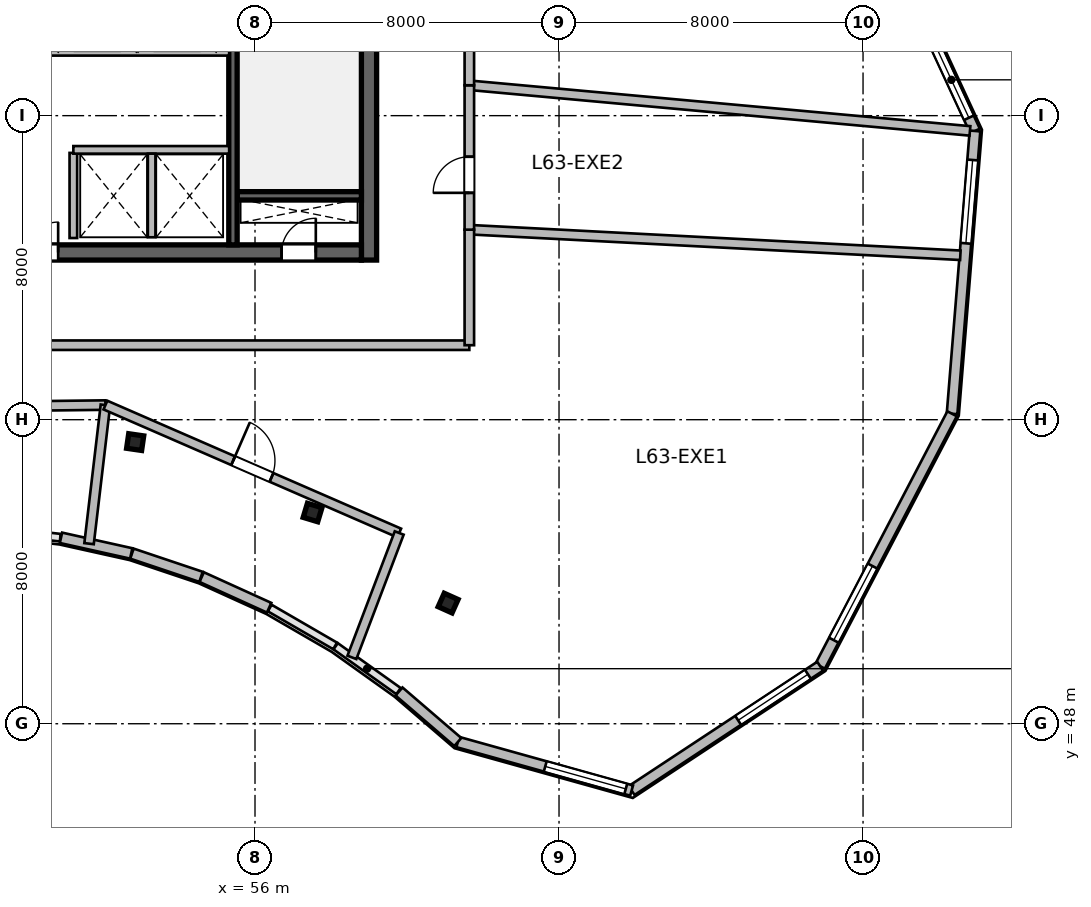
"""IFC4 building model, lengths in metres.
Left out: names, types, materials, properties, quantities, classifications, styles, units other than length and angle.
Written with IfcOpenShell. Run it as: python <this file> out.ifc"""

import sys

from ifc_helpers import new_model, si_unit, direction, frame, frame_2d, origin, origin_2d, place, context, subcontext, project, spatial, rectangle, i_section, extrude, source, transform, mapped, element, fill, save


model = new_model("IFC4")
c1 = context("Model", 3, precision=1e-05, world=origin(), true_north=direction((0.0, 1.0)))
c2 = subcontext(c1, "Body", "Model", "MODEL_VIEW")
j1 = project(units=[si_unit("LENGTHUNIT", "METRE"), si_unit("PLANEANGLEUNIT", "RADIAN")], contexts=[c1])
p1 = place(None, origin())
s1 = spatial("IfcSite", under=j1, at=p1, CompositionType="ELEMENT")
p2 = place(p1, origin())
s2 = spatial("IfcBuilding", under=s1, at=p2, CompositionType="ELEMENT")
p3 = place(p2, frame((0.0, 0.0, 260.1)))
s3 = spatial("IfcBuildingStorey", under=s2, at=p3, CompositionType="ELEMENT", Elevation=260.1)
m1 = source(origin(), c2, "Body", "SweptSolid", [
    extrude(rectangle(XDim=12.0, YDim=0.4, at=frame_2d((6.0, 0.0))), origin(), (0.0, 0.0, 1.0), 3.9),
])
p4 = place(p3, frame((59.0, 60.2, 0.0), z_axis=(0.0, 0.0, 1.0), x_axis=(0.0, 1.0, 0.0)))
e1 = element("IfcWall", 1, at=p4, inside=s3, PredefinedType="SHEAR", context=c2, shape_type="MappedRepresentation", body=[
    mapped(m1, transform((0.0, 0.0, 0.0), scale=1.0)),
])
m2 = source(origin(), c2, "Body", "SweptSolid", [
    extrude(rectangle(XDim=21.6, YDim=0.4, at=frame_2d((10.8, 0.0))), origin(), (0.0, 0.0, 1.0), 3.9),
])
p5 = place(p3, frame((37.2, 60.4, 0.0), z_axis=(0.0, 0.0, 1.0), x_axis=(1.0, 0.0, 0.0)))
e2 = element("IfcWall", 2, at=p5, inside=s3, PredefinedType="SHEAR", context=c2, shape_type="MappedRepresentation", body=[
    mapped(m2, transform((0.0, 0.0, 0.0), scale=1.0)),
])
p6 = place(p5, frame((1.1, 0.0, 0.0)))
e3 = element("IfcOpeningElement", 3, at=p6, cuts=e2, PredefinedType="OPENING", context=c2, shape_type="SweptSolid", body=[
    extrude(rectangle(XDim=1.15, YDim=2.15, at=frame_2d((0.575, 1.075))), frame((0.0, 0.21, 0.0), z_axis=(0.0, -1.0, 0.0), x_axis=(1.0, 0.0, 0.0)), (0.0, 0.0, 1.0), 0.42),
])
p7 = place(p5, frame((19.5, 0.0, 0.0)))
e4 = element("IfcOpeningElement", 4, at=p7, cuts=e2, PredefinedType="OPENING", context=c2, shape_type="SweptSolid", body=[
    extrude(rectangle(XDim=0.9, YDim=2.1, at=frame_2d((0.45, 1.05))), frame((0.0, 0.21, 0.0), z_axis=(0.0, -1.0, 0.0), x_axis=(1.0, 0.0, 0.0)), (0.0, 0.0, 1.0), 0.42),
])
p8 = place(p5, frame((12.02, 0.0, 0.0)))
e5 = element("IfcOpeningElement", 5, at=p8, cuts=e2, PredefinedType="OPENING", context=c2, shape_type="SweptSolid", body=[
    extrude(rectangle(XDim=1.6, YDim=2.15, at=frame_2d((0.8, 1.075))), frame((0.0, 0.21, 0.0), z_axis=(0.0, -1.0, 0.0), x_axis=(1.0, 0.0, 0.0)), (0.0, 0.0, 1.0), 0.42),
])
m3 = source(origin(), c2, "Body", "SweptSolid", [
    extrude(rectangle(XDim=3.27, YDim=0.22, at=frame_2d((1.635, 0.0))), origin(), (0.0, 0.0, 1.0), 3.9),
])
p9 = place(p3, frame((55.53, 61.89, 0.0), z_axis=(0.0, 0.0, 1.0), x_axis=(1.0, 0.0, 0.0)))
e6 = element("IfcWall", 6, at=p9, inside=s3, PredefinedType="SHEAR", context=c2, shape_type="MappedRepresentation", body=[
    mapped(m3, transform((0.0, 0.0, 0.0), scale=1.0)),
])
m4 = source(origin(), c2, "Body", "SweptSolid", [
    extrude(rectangle(XDim=11.2, YDim=0.22, at=frame_2d((5.6, 0.0))), origin(), (0.0, 0.0, 1.0), 3.9),
])
p10 = place(p3, frame((55.42, 60.6, 0.0), z_axis=(0.0, 0.0, 1.0), x_axis=(0.0, 1.0, 0.0)))
e7 = element("IfcWall", 7, at=p10, inside=s3, PredefinedType="SHEAR", context=c2, shape_type="MappedRepresentation", body=[
    mapped(m4, transform((0.0, 0.0, 0.0), scale=1.0)),
])
p11 = place(p10, frame((9.645, 0.0, 0.0)))
e8 = element("IfcOpeningElement", 8, at=p11, cuts=e7, PredefinedType="OPENING", context=c2, shape_type="SweptSolid", body=[
    extrude(rectangle(XDim=1.15, YDim=2.15, at=frame_2d((0.575, 1.075))), frame((0.0, 0.12, 0.0), z_axis=(0.0, -1.0, 0.0), x_axis=(1.0, 0.0, 0.0)), (0.0, 0.0, 1.0), 0.24),
])
m5 = source(origin(), c2, "Body", "SweptSolid", [
    extrude(i_section(OverallWidth=0.399, OverallDepth=0.387, WebThickness=0.021, FlangeThickness=0.033, at=origin_2d()), origin(), (0.0, 0.0, 1.0), 3.9),
])
for number, where, z_axis, x_axis in (
    (9, (52.846, 55.411, 0.0), (0.0, 0.0, 1.0), (0.143, 0.99, 0.0)),
    (10, (57.515, 53.558, 0.0), (0.0, 0.0, 1.0), (0.289, 0.957, 0.0)),
    (11, (61.082, 51.175, 0.0), (0.0, 0.0, 1.0), (0.409, 0.912, 0.0)),
):
    element("IfcColumn", number, at=place(p3, frame(where, z_axis=z_axis, x_axis=x_axis)), inside=s3, PredefinedType="COLUMN", context=c2, shape_type="MappedRepresentation", body=[
        mapped(m5, transform((0.0, 0.0, 0.0), scale=1.0)),
    ])
m6 = source(origin(), c2, "Body", "SweptSolid", [
    extrude(rectangle(XDim=5.928, YDim=0.28, at=frame_2d((2.964, 0.0))), origin(), (0.0, 0.0, 1.0), 3.65),
])
p12 = place(p3, frame((72.459, 68.979, 0.0), z_axis=(0.0, 0.0, 1.0), x_axis=(0.41942378221, -0.907790554543, 0.0)))
e12 = element("IfcWall", 12, at=p12, inside=s3, PredefinedType="SOLIDWALL", context=c2, shape_type="MappedRepresentation", body=[
    mapped(m6, transform((0.0, 0.0, 0.0), scale=1.0)),
])
p13 = place(p12, frame((3.346, 0.0, 0.95)))
e13 = element("IfcOpeningElement", 13, at=p13, cuts=e12, PredefinedType="OPENING", context=c2, shape_type="SweptSolid", body=[
    extrude(rectangle(XDim=2.2, YDim=2.1, at=frame_2d((1.1, 1.05))), frame((0.0, 0.15, 0.0), z_axis=(0.0, -1.0, 0.0), x_axis=(1.0, 0.0, 0.0)), (0.0, 0.0, 1.0), 0.3),
])
m7 = source(origin(), c2, "Body", "SweptSolid", [
    extrude(rectangle(XDim=7.466, YDim=0.28, at=frame_2d((3.733, 0.0))), origin(), (0.0, 0.0, 1.0), 3.65),
])
p14 = place(p3, frame((74.946, 63.597, 0.0), z_axis=(0.0, 0.0, 1.0), x_axis=(-0.080804454221, -0.996729973553, 0.0)))
e14 = element("IfcWall", 14, at=p14, inside=s3, PredefinedType="SOLIDWALL", context=c2, shape_type="MappedRepresentation", body=[
    mapped(m7, transform((0.0, 0.0, 0.0), scale=1.0)),
])
p15 = place(p14, frame((0.767, 0.0, 0.95)))
e15 = element("IfcOpeningElement", 15, at=p15, cuts=e14, PredefinedType="OPENING", context=c2, shape_type="SweptSolid", body=[
    extrude(rectangle(XDim=2.2, YDim=2.1, at=frame_2d((1.1, 1.05))), frame((0.0, 0.15, 0.0), z_axis=(0.0, -1.0, 0.0), x_axis=(1.0, 0.0, 0.0)), (0.0, 0.0, 1.0), 0.3),
])
m8 = source(origin(), c2, "Body", "SweptSolid", [
    extrude(rectangle(XDim=7.495, YDim=0.28, at=frame_2d((3.748, 0.0))), origin(), (0.0, 0.0, 1.0), 3.65),
])
p16 = place(p3, frame((74.343, 56.156, 0.0), z_axis=(0.0, 0.0, 1.0), x_axis=(-0.463116979657, -0.886297164135, 0.0)))
e16 = element("IfcWall", 16, at=p16, inside=s3, PredefinedType="SOLIDWALL", context=c2, shape_type="MappedRepresentation", body=[
    mapped(m8, transform((0.0, 0.0, 0.0), scale=1.0)),
])
p17 = place(p16, frame((4.521, 0.0, 0.95)))
e17 = element("IfcOpeningElement", 17, at=p17, cuts=e16, PredefinedType="OPENING", context=c2, shape_type="SweptSolid", body=[
    extrude(rectangle(XDim=2.2, YDim=2.1, at=frame_2d((1.1, 1.05))), frame((0.0, 0.15, 0.0), z_axis=(0.0, -1.0, 0.0), x_axis=(1.0, 0.0, 0.0)), (0.0, 0.0, 1.0), 0.3),
])
m9 = source(origin(), c2, "Body", "SweptSolid", [
    extrude(rectangle(XDim=5.942, YDim=0.28, at=frame_2d((2.971, 0.0))), origin(), (0.0, 0.0, 1.0), 3.65),
])
p18 = place(p3, frame((70.872, 49.513, 0.0), z_axis=(0.0, 0.0, 1.0), x_axis=(-0.834871099304, -0.550445499162, 0.0)))
e18 = element("IfcWall", 18, at=p18, inside=s3, PredefinedType="SOLIDWALL", context=c2, shape_type="MappedRepresentation", body=[
    mapped(m9, transform((0.0, 0.0, 0.0), scale=1.0)),
])
p19 = place(p18, frame((0.385, 0.0, 0.95)))
e19 = element("IfcOpeningElement", 19, at=p19, cuts=e18, PredefinedType="OPENING", context=c2, shape_type="SweptSolid", body=[
    extrude(rectangle(XDim=2.2, YDim=2.1, at=frame_2d((1.1, 1.05))), frame((0.0, 0.15, 0.0), z_axis=(0.0, -1.0, 0.0), x_axis=(1.0, 0.0, 0.0)), (0.0, 0.0, 1.0), 0.3),
])
m10 = source(origin(), c2, "Body", "SweptSolid", [
    extrude(rectangle(XDim=4.749, YDim=0.28, at=frame_2d((2.374, 0.0))), origin(), (0.0, 0.0, 1.0), 3.65),
])
p20 = place(p3, frame((65.91, 46.242, 0.0), z_axis=(0.0, 0.0, 1.0), x_axis=(-0.963210849911, 0.268746829961, 0.0)))
e20 = element("IfcWall", 20, at=p20, inside=s3, PredefinedType="SOLIDWALL", context=c2, shape_type="MappedRepresentation", body=[
    mapped(m10, transform((0.0, 0.0, 0.0), scale=1.0)),
])
p21 = place(p20, frame((0.16, 0.0, 0.95)))
e21 = element("IfcOpeningElement", 21, at=p21, cuts=e20, PredefinedType="OPENING", context=c2, shape_type="SweptSolid", body=[
    extrude(rectangle(XDim=2.2, YDim=2.1, at=frame_2d((1.1, 1.05))), frame((0.0, 0.15, 0.0), z_axis=(0.0, -1.0, 0.0), x_axis=(1.0, 0.0, 0.0)), (0.0, 0.0, 1.0), 0.3),
])
m11 = source(origin(), c2, "Body", "SweptSolid", [
    extrude(rectangle(XDim=2.04, YDim=0.28, at=frame_2d((1.02, 0.0))), origin(), (0.0, 0.0, 1.0), 3.65),
])
p22 = place(p3, frame((61.337, 47.519, 0.0), z_axis=(0.0, 0.0, 1.0), x_axis=(-0.758402847119, 0.651786101019, 0.0)))
e22 = element("IfcWall", 22, at=p22, inside=s3, PredefinedType="SOLIDWALL", context=c2, shape_type="MappedRepresentation", body=[
    mapped(m11, transform((0.0, 0.0, 0.0), scale=1.0)),
])
m12 = source(origin(), c2, "Body", "SweptSolid", [
    extrude(rectangle(XDim=1.95, YDim=0.28, at=frame_2d((0.975, 0.0))), origin(), (0.0, 0.0, 1.0), 3.65),
])
p23 = place(p3, frame((56.372, 51.052, 0.0), z_axis=(0.0, 0.0, 1.0), x_axis=(-0.910507945155, 0.413491574048, 0.0)))
e23 = element("IfcWall", 23, at=p23, inside=s3, PredefinedType="SOLIDWALL", context=c2, shape_type="MappedRepresentation", body=[
    mapped(m12, transform((0.0, 0.0, 0.0), scale=1.0)),
])
m13 = source(origin(), c2, "Body", "SweptSolid", [
    extrude(rectangle(XDim=1.918, YDim=0.28, at=frame_2d((0.959, 0.0))), origin(), (0.0, 0.0, 1.0), 3.65),
])
p24 = place(p3, frame((54.579, 51.865, 0.0), z_axis=(0.0, 0.0, 1.0), x_axis=(-0.947916697588, 0.318518342381, 0.0)))
e24 = element("IfcWall", 24, at=p24, inside=s3, PredefinedType="SOLIDWALL", context=c2, shape_type="MappedRepresentation", body=[
    mapped(m13, transform((0.0, 0.0, 0.0), scale=1.0)),
])
m14 = source(origin(), c2, "Body", "SweptSolid", [
    extrude(rectangle(XDim=1.894, YDim=0.28, at=frame_2d((0.947, 0.0))), origin(), (0.0, 0.0, 1.0), 3.65),
])
p25 = place(p3, frame((52.743, 52.481, 0.0), z_axis=(0.0, 0.0, 1.0), x_axis=(-0.976156721324, 0.217066937635, 0.0)))
e25 = element("IfcWall", 25, at=p25, inside=s3, PredefinedType="SOLIDWALL", context=c2, shape_type="MappedRepresentation", body=[
    mapped(m14, transform((0.0, 0.0, 0.0), scale=1.0)),
])
m15 = source(origin(), c2, "Body", "SweptSolid", [
    extrude(rectangle(XDim=2.24, YDim=0.2, at=frame_2d((1.12, 0.0))), origin(), (0.0, 0.0, 1.0), 3.65),
])
p26 = place(p3, frame((51.22, 60.78, 0.0), z_axis=(0.0, 0.0, 1.0), x_axis=(0.0, 1.0, 0.0)))
e26 = element("IfcWall", 26, at=p26, inside=s3, PredefinedType="SOLIDWALL", context=c2, shape_type="MappedRepresentation", body=[
    mapped(m15, transform((0.0, 0.0, 0.0), scale=1.0)),
])
m16 = source(origin(), c2, "Body", "SweptSolid", [
    extrude(rectangle(XDim=5.62, YDim=0.2, at=frame_2d((2.81, 0.0))), origin(), (0.0, 0.0, 1.0), 3.65),
])
p27 = place(p3, frame((49.7, 65.68, 0.0), z_axis=(0.0, 0.0, 1.0), x_axis=(1.0, 0.0, 0.0)))
e27 = element("IfcWall", 27, at=p27, inside=s3, PredefinedType="SOLIDWALL", context=c2, shape_type="MappedRepresentation", body=[
    mapped(m16, transform((0.0, 0.0, 0.0), scale=1.0)),
])
m17 = source(origin(), c2, "Body", "SweptSolid", [
    extrude(rectangle(XDim=4.1, YDim=0.2, at=frame_2d((2.05, 0.0))), origin(), (0.0, 0.0, 1.0), 3.65),
])
p28 = place(p3, frame((51.22, 63.1, 0.0), z_axis=(0.0, 0.0, 1.0), x_axis=(1.0, 0.0, 0.0)))
e28 = element("IfcWall", 28, at=p28, inside=s3, PredefinedType="SOLIDWALL", context=c2, shape_type="MappedRepresentation", body=[
    mapped(m17, transform((0.0, 0.0, 0.0), scale=1.0)),
])
m18 = source(origin(), c2, "Body", "SweptSolid", [
    extrude(rectangle(XDim=2.2, YDim=0.2, at=frame_2d((1.1, 0.0))), origin(), (0.0, 0.0, 1.0), 3.65),
])
p29 = place(p3, frame((53.28, 60.8, 0.0), z_axis=(0.0, 0.0, 1.0), x_axis=(0.0, 1.0, 0.0)))
e29 = element("IfcWall", 29, at=p29, inside=s3, PredefinedType="SOLIDWALL", context=c2, shape_type="MappedRepresentation", body=[
    mapped(m18, transform((0.0, 0.0, 0.0), scale=1.0)),
])
m19 = source(origin(), c2, "Body", "SweptSolid", [
    extrude(rectangle(XDim=8.576, YDim=0.25, at=frame_2d((4.288, 0.0))), origin(), (0.0, 0.0, 1.0), 3.65),
])
p30 = place(p3, frame((43.489, 56.284, 0.0), z_axis=(0.0, 0.0, 1.0), x_axis=(0.999931553434, 0.011699933624, 0.0)))
e30 = element("IfcWall", 30, at=p30, inside=s3, PredefinedType="PARTITIONING", context=c2, shape_type="MappedRepresentation", body=[
    mapped(m19, transform((0.0, 0.0, 0.0), scale=1.0)),
])
p31 = place(p30, frame((2.988, 0.0, 0.0)))
e31 = element("IfcOpeningElement", 31, at=p31, cuts=e30, PredefinedType="OPENING", context=c2, shape_type="SweptSolid", body=[
    extrude(rectangle(XDim=1.1, YDim=2.15, at=frame_2d((0.55, 1.075))), frame((0.0, 0.135, 0.0), z_axis=(0.0, -1.0, 0.0), x_axis=(1.0, 0.0, 0.0)), (0.0, 0.0, 1.0), 0.27),
])
m20 = source(origin(), c2, "Body", "SweptSolid", [
    extrude(rectangle(XDim=3.672, YDim=0.25, at=frame_2d((1.836, 0.0))), origin(), (0.0, 0.0, 1.0), 3.65),
])
p32 = place(p3, frame((51.633, 52.738, 0.0), z_axis=(0.0, 0.0, 1.0), x_axis=(0.117362064027, 0.993089193339, 0.0)))
e32 = element("IfcWall", 32, at=p32, inside=s3, PredefinedType="PARTITIONING", context=c2, shape_type="MappedRepresentation", body=[
    mapped(m20, transform((0.0, 0.0, 0.0), scale=1.0)),
])
m21 = source(origin(), c2, "Body", "SweptSolid", [
    extrude(rectangle(XDim=8.431, YDim=0.25, at=frame_2d((4.216, 0.0))), origin(), (0.0, 0.0, 1.0), 3.65),
])
p33 = place(p3, frame((52.064, 56.385, 0.0), z_axis=(0.0, 0.0, 1.0), x_axis=(0.916868304583, -0.399189819574, 0.0)))
e33 = element("IfcWall", 33, at=p33, inside=s3, PredefinedType="PARTITIONING", context=c2, shape_type="MappedRepresentation", body=[
    mapped(m21, transform((0.0, 0.0, 0.0), scale=1.0)),
])
p34 = place(p33, frame((3.666, 0.0, 0.0)))
e34 = element("IfcOpeningElement", 34, at=p34, cuts=e33, PredefinedType="OPENING", context=c2, shape_type="SweptSolid", body=[
    extrude(rectangle(XDim=1.1, YDim=2.15, at=frame_2d((0.55, 1.075))), frame((0.0, 0.135, 0.0), z_axis=(0.0, -1.0, 0.0), x_axis=(1.0, 0.0, 0.0)), (0.0, 0.0, 1.0), 0.27),
])
m22 = source(origin(), c2, "Body", "SweptSolid", [
    extrude(rectangle(XDim=3.502, YDim=0.25, at=frame_2d((1.751, 0.0))), origin(), (0.0, 0.0, 1.0), 3.65),
])
p35 = place(p3, frame((58.55, 49.746, 0.0), z_axis=(0.0, 0.0, 1.0), x_axis=(0.35542122772, 0.934706237749, 0.0)))
e35 = element("IfcWall", 35, at=p35, inside=s3, PredefinedType="PARTITIONING", context=c2, shape_type="MappedRepresentation", body=[
    mapped(m22, transform((0.0, 0.0, 0.0), scale=1.0)),
])
m23 = source(origin(), c2, "Body", "SweptSolid", [
    extrude(rectangle(XDim=12.39, YDim=0.25, at=frame_2d((6.195, 0.0))), origin(), (0.0, 0.0, 1.0), 3.65),
])
p36 = place(p3, frame((49.25, 57.96, 0.0), z_axis=(0.0, 0.0, 1.0), x_axis=(1.0, 0.0, 0.0)))
e36 = element("IfcWall", 36, at=p36, inside=s3, PredefinedType="PARTITIONING", context=c2, shape_type="MappedRepresentation", body=[
    mapped(m23, transform((0.0, 0.0, 0.0), scale=1.0)),
])
m24 = source(origin(), c2, "Body", "SweptSolid", [
    extrude(rectangle(XDim=12.938, YDim=0.25, at=frame_2d((6.469, 0.0))), origin(), (0.0, 0.0, 1.0), 3.65),
])
p37 = place(p3, frame((61.64, 61.0, 0.0), z_axis=(0.0, 0.0, 1.0), x_axis=(0.998643821866, -0.052062626215, 0.0)))
e37 = element("IfcWall", 37, at=p37, inside=s3, PredefinedType="PARTITIONING", context=c2, shape_type="MappedRepresentation", body=[
    mapped(m24, transform((0.0, 0.0, 0.0), scale=1.0)),
])
m25 = source(origin(), c2, "Body", "SweptSolid", [
    extrude(rectangle(XDim=3.04, YDim=0.25, at=frame_2d((1.52, 0.0))), origin(), (0.0, 0.0, 1.0), 3.65),
])
p38 = place(p3, frame((61.64, 57.96, 0.0), z_axis=(0.0, 0.0, 1.0), x_axis=(0.0, 1.0, 0.0)))
e38 = element("IfcWall", 38, at=p38, inside=s3, PredefinedType="PARTITIONING", context=c2, shape_type="MappedRepresentation", body=[
    mapped(m25, transform((0.0, 0.0, 0.0), scale=1.0)),
])
m26 = source(origin(), c2, "Body", "SweptSolid", [
    extrude(rectangle(XDim=13.228, YDim=0.25, at=frame_2d((6.614, 0.0))), origin(), (0.0, 0.0, 1.0), 3.65),
])
p39 = place(p3, frame((61.64, 64.8, 0.0), z_axis=(0.0, 0.0, 1.0), x_axis=(0.995868510157, -0.090806995755, 0.0)))
e39 = element("IfcWall", 39, at=p39, inside=s3, PredefinedType="PARTITIONING", context=c2, shape_type="MappedRepresentation", body=[
    mapped(m26, transform((0.0, 0.0, 0.0), scale=1.0)),
])
m27 = source(origin(), c2, "Body", "SweptSolid", [
    extrude(rectangle(XDim=3.8, YDim=0.25, at=frame_2d((1.9, 0.0))), origin(), (0.0, 0.0, 1.0), 3.65),
])
p40 = place(p3, frame((61.64, 61.0, 0.0), z_axis=(0.0, 0.0, 1.0), x_axis=(0.0, 1.0, 0.0)))
e40 = element("IfcWall", 40, at=p40, inside=s3, PredefinedType="PARTITIONING", context=c2, shape_type="MappedRepresentation", body=[
    mapped(m27, transform((0.0, 0.0, 0.0), scale=1.0)),
])
p41 = place(p40, frame((0.969, 0.0, 0.0)))
e41 = element("IfcOpeningElement", 41, at=p41, cuts=e40, PredefinedType="OPENING", context=c2, shape_type="SweptSolid", body=[
    extrude(rectangle(XDim=0.95, YDim=2.1, at=frame_2d((0.475, 1.05))), frame((0.0, 0.135, 0.0), z_axis=(0.0, -1.0, 0.0), x_axis=(1.0, 0.0, 0.0)), (0.0, 0.0, 1.0), 0.27),
])
m28 = source(origin(), c2, "Body", "SweptSolid", [
    extrude(rectangle(XDim=11.445, YDim=0.25, at=frame_2d((5.722, 0.0))), origin(), (0.0, 0.0, 1.0), 3.65),
])
p42 = place(p3, frame((61.64, 64.8, 0.0), z_axis=(0.0, 0.0, 1.0), x_axis=(0.0, 1.0, 0.0)))
e42 = element("IfcWall", 42, at=p42, inside=s3, PredefinedType="PARTITIONING", context=c2, shape_type="MappedRepresentation", body=[
    mapped(m28, transform((0.0, 0.0, 0.0), scale=1.0)),
])
p43 = place(p42, frame((5.247, 0.0, 0.0)))
e43 = element("IfcOpeningElement", 43, at=p43, cuts=e42, PredefinedType="OPENING", context=c2, shape_type="SweptSolid", body=[
    extrude(rectangle(XDim=0.95, YDim=2.1, at=frame_2d((0.475, 1.05))), frame((0.0, 0.135, 0.0), z_axis=(0.0, -1.0, 0.0), x_axis=(1.0, 0.0, 0.0)), (0.0, 0.0, 1.0), 0.27),
])
m29 = source(origin(), c2, "Body", "SweptSolid", [
    extrude(rectangle(XDim=2.2, YDim=2.1, at=frame_2d((1.1, 1.05))), frame((0.0, 0.03, 0.0), z_axis=(0.0, -1.0, 0.0), x_axis=(1.0, 0.0, 0.0)), (0.0, 0.0, 1.0), 0.06),
])
p44 = place(p13, origin())
e44 = element("IfcWindow", 44, at=p44, inside=s3, PartitioningType="TRIPLE_PANEL_VERTICAL", PredefinedType="WINDOW", context=c2, shape_type="MappedRepresentation", body=[
    mapped(m29, transform((0.0, 0.0, 0.0), scale=1.0)),
])
fill(e13, e44)
p45 = place(p15, origin())
e45 = element("IfcWindow", 45, at=p45, inside=s3, PartitioningType="TRIPLE_PANEL_VERTICAL", PredefinedType="WINDOW", context=c2, shape_type="MappedRepresentation", body=[
    mapped(m29, transform((0.0, 0.0, 0.0), scale=1.0)),
])
fill(e15, e45)
p46 = place(p17, origin())
e46 = element("IfcWindow", 46, at=p46, inside=s3, PartitioningType="TRIPLE_PANEL_VERTICAL", PredefinedType="WINDOW", context=c2, shape_type="MappedRepresentation", body=[
    mapped(m29, transform((0.0, 0.0, 0.0), scale=1.0)),
])
fill(e17, e46)
p47 = place(p19, origin())
e47 = element("IfcWindow", 47, at=p47, inside=s3, PartitioningType="TRIPLE_PANEL_VERTICAL", PredefinedType="WINDOW", context=c2, shape_type="MappedRepresentation", body=[
    mapped(m29, transform((0.0, 0.0, 0.0), scale=1.0)),
])
fill(e19, e47)
p48 = place(p21, origin())
e48 = element("IfcWindow", 48, at=p48, inside=s3, PartitioningType="TRIPLE_PANEL_VERTICAL", PredefinedType="WINDOW", context=c2, shape_type="MappedRepresentation", body=[
    mapped(m29, transform((0.0, 0.0, 0.0), scale=1.0)),
])
fill(e21, e48)
m30 = source(origin(), c2, "Body", "SweptSolid", [
    extrude(rectangle(XDim=0.9, YDim=2.1, at=frame_2d((0.45, 1.05))), frame((0.0, 0.025, 0.0), z_axis=(0.0, -1.0, 0.0), x_axis=(1.0, 0.0, 0.0)), (0.0, 0.0, 1.0), 0.05),
])
p49 = place(p7, origin())
e49 = element("IfcDoor", 49, at=p49, inside=s3, OperationType="SINGLE_SWING_RIGHT", PredefinedType="DOOR", context=c2, shape_type="MappedRepresentation", body=[
    mapped(m30, transform((0.0, 0.0, 0.0), scale=1.0)),
])
fill(e4, e49)
m31 = source(origin(), c2, "Body", "SweptSolid", [
    extrude(rectangle(XDim=1.6, YDim=2.15, at=frame_2d((0.8, 1.075))), frame((0.0, 0.025, 0.0), z_axis=(0.0, -1.0, 0.0), x_axis=(1.0, 0.0, 0.0)), (0.0, 0.0, 1.0), 0.05),
])
p50 = place(p8, origin())
e50 = element("IfcDoor", 50, at=p50, inside=s3, OperationType="DOUBLE_DOOR_SINGLE_SWING", PredefinedType="DOOR", context=c2, shape_type="MappedRepresentation", body=[
    mapped(m31, transform((0.0, 0.0, 0.0), scale=1.0)),
])
fill(e5, e50)
m32 = source(origin(), c2, "Body", "SweptSolid", [
    extrude(rectangle(XDim=1.1, YDim=2.15, at=frame_2d((0.55, 1.075))), frame((0.0, 0.025, 0.0), z_axis=(0.0, -1.0, 0.0), x_axis=(1.0, 0.0, 0.0)), (0.0, 0.0, 1.0), 0.05),
])
p51 = place(p34, origin())
e51 = element("IfcDoor", 51, at=p51, inside=s3, OperationType="SINGLE_SWING_LEFT", PredefinedType="DOOR", context=c2, shape_type="MappedRepresentation", body=[
    mapped(m32, transform((0.0, 0.0, 0.0), scale=1.0)),
])
fill(e34, e51)
m33 = source(origin(), c2, "Body", "SweptSolid", [
    extrude(rectangle(XDim=0.95, YDim=2.1, at=frame_2d((0.475, 1.05))), frame((0.0, 0.025, 0.0), z_axis=(0.0, -1.0, 0.0), x_axis=(1.0, 0.0, 0.0)), (0.0, 0.0, 1.0), 0.05),
])
p52 = place(p41, origin())
e52 = element("IfcDoor", 52, at=p52, inside=s3, OperationType="SINGLE_SWING_LEFT", PredefinedType="DOOR", context=c2, shape_type="MappedRepresentation", body=[
    mapped(m33, transform((0.0, 0.0, 0.0), scale=1.0)),
])
fill(e41, e52)
save(model, sys.argv[1])
